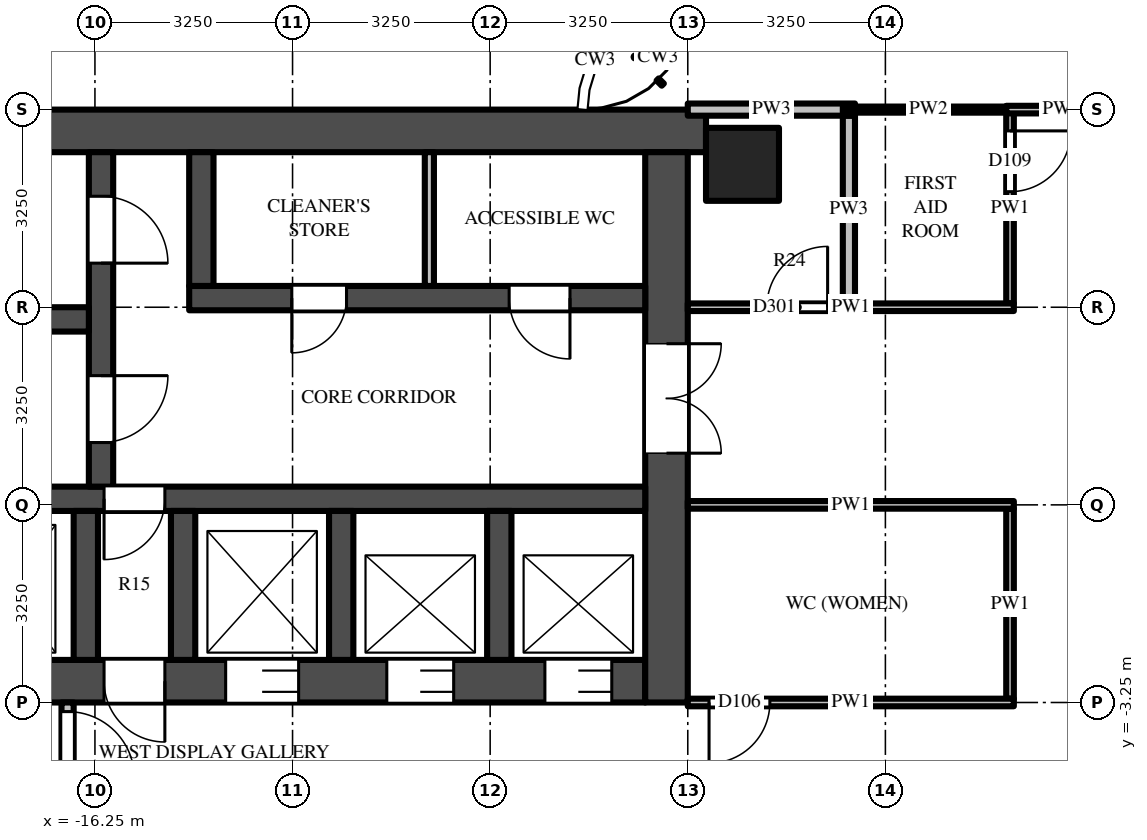
"""IFC4 building model, lengths in metres.
Left out: names, types, materials, properties, quantities, classifications, styles, units other than length and angle.
Written with IfcOpenShell. Run it as: python <this file> out.ifc"""

import sys

from ifc_helpers import new_model, si_unit, direction, frame, frame_2d, origin, origin_2d, place, context, subcontext, project, spatial, rectangle, extrude, source, transform, mapped, element, fill, save


model = new_model("IFC4")
c1 = context("Model", 3, precision=1e-05, world=origin(), true_north=direction((0.0, 1.0)))
c2 = subcontext(c1, "Body", "Model", "MODEL_VIEW")
j1 = project(units=[si_unit("LENGTHUNIT", "METRE"), si_unit("PLANEANGLEUNIT", "RADIAN")], contexts=[c1])
p1 = place(None, origin())
s1 = spatial("IfcSite", under=j1, at=p1, CompositionType="ELEMENT")
p2 = place(p1, origin())
s2 = spatial("IfcBuilding", under=s1, at=p2, CompositionType="ELEMENT")
p3 = place(p2, frame((0.0, 0.0, 208.8)))
s3 = spatial("IfcBuildingStorey", under=s2, at=p3, CompositionType="ELEMENT", Elevation=208.8)
m1 = source(origin(), c2, "Body", "SweptSolid", [
    extrude(rectangle(XDim=1.2, YDim=1.2, at=origin_2d()), origin(), (0.0, 0.0, 1.0), 3.9),
])
p4 = place(p3, frame((-5.6, 5.6, 0.0), z_axis=(0.0, 0.0, 1.0), x_axis=(1.0, 0.0, 0.0)))
e1 = element("IfcColumn", 1, at=p4, inside=s3, PredefinedType="COLUMN", context=c2, shape_type="MappedRepresentation", body=[
    mapped(m1, transform((0.0, 0.0, 0.0))),
])
m2 = source(origin(), c2, "Body", "SweptSolid", [
    extrude(rectangle(XDim=16.55, YDim=0.7, at=frame_2d((8.275, 0.0))), origin(), (0.0, 0.0, 1.0), 3.45),
])
p5 = place(p3, frame((-6.2, 6.15, 0.0), z_axis=(0.0, 0.0, 1.0), x_axis=(-1.0, 0.0, 0.0)))
e2 = element("IfcWall", 2, at=p5, inside=s3, PredefinedType="SHEAR", context=c2, shape_type="MappedRepresentation", body=[
    mapped(m2, transform((0.0, 0.0, 0.0))),
])
m3 = source(origin(), c2, "Body", "SweptSolid", [
    extrude(rectangle(XDim=14.85, YDim=0.7, at=frame_2d((7.425, 0.0))), origin(), (0.0, 0.0, 1.0), 3.45),
])
p6 = place(p3, frame((-7.2, -2.9, 0.0), z_axis=(0.0, 0.0, 1.0), x_axis=(-1.0, 0.0, 0.0)))
e3 = element("IfcWall", 3, at=p6, inside=s3, PredefinedType="SHEAR", context=c2, shape_type="MappedRepresentation", body=[
    mapped(m3, transform((0.0, 0.0, 0.0))),
])
m4 = source(origin(), c2, "Body", "SweptSolid", [
    extrude(rectangle(XDim=1.1, YDim=2.1, at=frame_2d((0.55, 1.05))), frame((0.0, 0.36, 0.0), z_axis=(0.0, -1.0, 0.0), x_axis=(1.0, 0.0, 0.0)), (0.0, 0.0, 1.0), 0.72),
])
p7 = place(p6, frame((0.55, 0.0, 0.0)))
e4 = element("IfcOpeningElement", 4, at=p7, cuts=e3, PredefinedType="OPENING", context=c2, shape_type="MappedRepresentation", body=[
    mapped(m4, transform((0.0, 0.0, 0.0))),
])
p8 = place(p6, frame((3.15, 0.0, 0.0)))
e5 = element("IfcOpeningElement", 5, at=p8, cuts=e3, PredefinedType="OPENING", context=c2, shape_type="MappedRepresentation", body=[
    mapped(m4, transform((0.0, 0.0, 0.0))),
])
m5 = source(origin(), c2, "Body", "SweptSolid", [
    extrude(rectangle(XDim=1.2, YDim=2.1, at=frame_2d((0.6, 1.05))), frame((0.0, 0.36, 0.0), z_axis=(0.0, -1.0, 0.0), x_axis=(1.0, 0.0, 0.0)), (0.0, 0.0, 1.0), 0.72),
])
p9 = place(p6, frame((5.7, 0.0, 0.0)))
e6 = element("IfcOpeningElement", 6, at=p9, cuts=e3, PredefinedType="OPENING", context=c2, shape_type="MappedRepresentation", body=[
    mapped(m5, transform((0.0, 0.0, 0.0))),
])
m6 = source(origin(), c2, "Body", "SweptSolid", [
    extrude(rectangle(XDim=1.3, YDim=2.1, at=frame_2d((0.65, 1.05))), frame((0.0, 0.36, 0.0), z_axis=(0.0, -1.0, 0.0), x_axis=(1.0, 0.0, 0.0)), (0.0, 0.0, 1.0), 0.72),
])
p10 = place(p6, frame((12.2, 0.0, 0.0)))
e7 = element("IfcOpeningElement", 7, at=p10, cuts=e3, PredefinedType="OPENING", context=c2, shape_type="MappedRepresentation", body=[
    mapped(m6, transform((0.0, 0.0, 0.0))),
])
p11 = place(p6, frame((9.85, 0.0, 0.0)))
e8 = element("IfcOpeningElement", 8, at=p11, cuts=e3, PredefinedType="OPENING", context=c2, shape_type="MappedRepresentation", body=[
    mapped(m5, transform((0.0, 0.0, 0.0))),
])
m7 = source(origin(), c2, "Body", "SweptSolid", [
    extrude(rectangle(XDim=1.0, YDim=2.1, at=frame_2d((0.5, 1.05))), frame((0.0, 0.36, 0.0), z_axis=(0.0, -1.0, 0.0), x_axis=(1.0, 0.0, 0.0)), (0.0, 0.0, 1.0), 0.72),
])
p12 = place(p6, frame((7.9, 0.0, 0.0)))
e9 = element("IfcOpeningElement", 9, at=p12, cuts=e3, PredefinedType="OPENING", context=c2, shape_type="MappedRepresentation", body=[
    mapped(m7, transform((0.0, 0.0, 0.0))),
])
m8 = source(origin(), c2, "Body", "SweptSolid", [
    extrude(rectangle(XDim=9.05, YDim=0.7, at=frame_2d((4.525, 0.0))), origin(), (0.0, 0.0, 1.0), 3.45),
])
p13 = place(p3, frame((-6.85, 5.8, 0.0), z_axis=(0.0, 0.0, 1.0), x_axis=(0.0, -1.0, 0.0)))
e10 = element("IfcWall", 10, at=p13, inside=s3, PredefinedType="SHEAR", context=c2, shape_type="MappedRepresentation", body=[
    mapped(m8, transform((0.0, 0.0, 0.0))),
])
m9 = source(origin(), c2, "Body", "SweptSolid", [
    extrude(rectangle(XDim=1.8, YDim=2.1, at=frame_2d((0.9, 1.05))), frame((0.0, 0.36, 0.0), z_axis=(0.0, -1.0, 0.0), x_axis=(1.0, 0.0, 0.0)), (0.0, 0.0, 1.0), 0.72),
])
p14 = place(p13, frame((3.15, 0.0, 0.0)))
e11 = element("IfcOpeningElement", 11, at=p14, cuts=e10, PredefinedType="OPENING", context=c2, shape_type="MappedRepresentation", body=[
    mapped(m9, transform((0.0, 0.0, 0.0))),
])
m10 = source(origin(), c2, "Body", "SweptSolid", [
    extrude(rectangle(XDim=7.5, YDim=0.4, at=frame_2d((3.75, 0.0))), origin(), (0.0, 0.0, 1.0), 3.45),
])
p15 = place(p3, frame((-7.2, 3.4, 0.0), z_axis=(0.0, 0.0, 1.0), x_axis=(-1.0, 0.0, 0.0)))
e12 = element("IfcWall", 12, at=p15, inside=s3, PredefinedType="SHEAR", context=c2, shape_type="MappedRepresentation", body=[
    mapped(m10, transform((0.0, 0.0, 0.0))),
])
m11 = source(origin(), c2, "Body", "SweptSolid", [
    extrude(rectangle(XDim=1.0, YDim=2.1, at=frame_2d((0.5, 1.05))), frame((0.0, 0.21, 0.0), z_axis=(0.0, -1.0, 0.0), x_axis=(1.0, 0.0, 0.0)), (0.0, 0.0, 1.0), 0.42),
])
p16 = place(p15, frame((1.238, 0.0, 0.0)))
e13 = element("IfcOpeningElement", 13, at=p16, cuts=e12, PredefinedType="OPENING", context=c2, shape_type="MappedRepresentation", body=[
    mapped(m11, transform((0.0, 0.0, 0.0))),
])
m12 = source(origin(), c2, "Body", "SweptSolid", [
    extrude(rectangle(XDim=0.9, YDim=2.1, at=frame_2d((0.45, 1.05))), frame((0.0, 0.21, 0.0), z_axis=(0.0, -1.0, 0.0), x_axis=(1.0, 0.0, 0.0)), (0.0, 0.0, 1.0), 0.42),
])
p17 = place(p15, frame((4.913, 0.0, 0.0)))
e14 = element("IfcOpeningElement", 14, at=p17, cuts=e12, PredefinedType="OPENING", context=c2, shape_type="MappedRepresentation", body=[
    mapped(m12, transform((0.0, 0.0, 0.0))),
])
m13 = source(origin(), c2, "Body", "SweptSolid", [
    extrude(rectangle(XDim=14.85, YDim=0.4, at=frame_2d((7.425, 0.0))), origin(), (0.0, 0.0, 1.0), 3.45),
])
p18 = place(p3, frame((-7.2, 0.1, 0.0), z_axis=(0.0, 0.0, 1.0), x_axis=(-1.0, 0.0, 0.0)))
e15 = element("IfcWall", 15, at=p18, inside=s3, PredefinedType="SHEAR", context=c2, shape_type="MappedRepresentation", body=[
    mapped(m13, transform((0.0, 0.0, 0.0))),
])
p19 = place(p18, frame((7.9, 0.0, 0.0)))
e16 = element("IfcOpeningElement", 16, at=p19, cuts=e15, PredefinedType="OPENING", context=c2, shape_type="MappedRepresentation", body=[
    mapped(m11, transform((0.0, 0.0, 0.0))),
])
m14 = source(origin(), c2, "Body", "SweptSolid", [
    extrude(rectangle(XDim=5.5, YDim=0.4, at=frame_2d((2.75, 0.0))), origin(), (0.0, 0.0, 1.0), 3.45),
])
p20 = place(p3, frame((-16.15, 5.8, 0.0), z_axis=(0.0, 0.0, 1.0), x_axis=(0.0, -1.0, 0.0)))
e17 = element("IfcWall", 17, at=p20, inside=s3, PredefinedType="SHEAR", context=c2, shape_type="MappedRepresentation", body=[
    mapped(m14, transform((0.0, 0.0, 0.0))),
])
m15 = source(origin(), c2, "Body", "SweptSolid", [
    extrude(rectangle(XDim=1.1, YDim=2.1, at=frame_2d((0.55, 1.05))), frame((0.0, 0.21, 0.0), z_axis=(0.0, -1.0, 0.0), x_axis=(1.0, 0.0, 0.0)), (0.0, 0.0, 1.0), 0.42),
])
p21 = place(p20, frame((0.725, 0.0, 0.0)))
e18 = element("IfcOpeningElement", 18, at=p21, cuts=e17, PredefinedType="OPENING", context=c2, shape_type="MappedRepresentation", body=[
    mapped(m15, transform((0.0, 0.0, 0.0))),
])
p22 = place(p20, frame((3.675, 0.0, 0.0)))
e19 = element("IfcOpeningElement", 19, at=p22, cuts=e17, PredefinedType="OPENING", context=c2, shape_type="MappedRepresentation", body=[
    mapped(m15, transform((0.0, 0.0, 0.0))),
])
m16 = source(origin(), c2, "Body", "SweptSolid", [
    extrude(rectangle(XDim=5.7, YDim=0.4, at=frame_2d((2.85, 0.0))), origin(), (0.0, 0.0, 1.0), 3.45),
])
p23 = place(p3, frame((-16.35, 3.05, 0.0), z_axis=(0.0, 0.0, 1.0), x_axis=(-1.0, 0.0, 0.0)))
e20 = element("IfcWall", 20, at=p23, inside=s3, PredefinedType="SHEAR", context=c2, shape_type="MappedRepresentation", body=[
    mapped(m16, transform((0.0, 0.0, 0.0))),
])
m17 = source(origin(), c2, "Body", "SweptSolid", [
    extrude(rectangle(XDim=2.2, YDim=0.4, at=frame_2d((1.1, 0.0))), origin(), (0.0, 0.0, 1.0), 3.45),
])
p24 = place(p3, frame((-14.5, 5.8, 0.0), z_axis=(0.0, 0.0, 1.0), x_axis=(0.0, -1.0, 0.0)))
e21 = element("IfcWall", 21, at=p24, inside=s3, PredefinedType="SHEAR", context=c2, shape_type="MappedRepresentation", body=[
    mapped(m17, transform((0.0, 0.0, 0.0))),
])
m18 = source(origin(), c2, "Body", "SweptSolid", [
    extrude(rectangle(XDim=2.45, YDim=0.4, at=frame_2d((1.225, 0.0))), origin(), (0.0, 0.0, 1.0), 3.45),
])
for number, where, z_axis, x_axis in (
    (22, (-9.6, -0.1, 0.0), (0.0, 0.0, 1.0), (0.0, -1.0, 0.0)),
    (23, (-12.2, -0.1, 0.0), (0.0, 0.0, 1.0), (0.0, -1.0, 0.0)),
    (24, (-14.8, -0.1, 0.0), (0.0, 0.0, 1.0), (0.0, -1.0, 0.0)),
    (25, (-16.4, -0.1, 0.0), (0.0, 0.0, 1.0), (0.0, -1.0, 0.0)),
):
    element("IfcWall", number, at=place(p3, frame(where, z_axis=z_axis, x_axis=x_axis)), inside=s3, PredefinedType="SHEAR", context=c2, shape_type="MappedRepresentation", body=[
        mapped(m18, transform((0.0, 0.0, 0.0))),
    ])
m19 = source(origin(), c2, "Body", "SweptSolid", [
    extrude(rectangle(XDim=3.25, YDim=0.2, at=frame_2d((1.625, 0.0))), origin(), (0.0, 0.0, 1.0), 3.45),
])
p25 = place(p3, frame((-16.7, -3.25, 0.0), z_axis=(0.0, 0.0, 1.0), x_axis=(0.0, -1.0, 0.0)))
e26 = element("IfcWall", 26, at=p25, inside=s3, PredefinedType="PARTITIONING", context=c2, shape_type="MappedRepresentation", body=[
    mapped(m19, transform((0.0, 0.0, 0.0))),
])
m20 = source(origin(), c2, "Body", "SweptSolid", [
    extrude(rectangle(XDim=1.1, YDim=2.1, at=frame_2d((0.55, 1.05))), frame((0.0, 0.11, 0.0), z_axis=(0.0, -1.0, 0.0), x_axis=(1.0, 0.0, 0.0)), (0.0, 0.0, 1.0), 0.22),
])
p26 = place(p25, frame((0.15, 0.0, 0.0)))
e27 = element("IfcOpeningElement", 27, at=p26, cuts=e26, PredefinedType="OPENING", context=c2, shape_type="MappedRepresentation", body=[
    mapped(m20, transform((0.0, 0.0, 0.0))),
])
m21 = source(origin(), c2, "Body", "SweptSolid", [
    extrude(rectangle(XDim=2.2, YDim=0.15, at=frame_2d((1.1, 0.0))), origin(), (0.0, 0.0, 1.0), 3.45),
])
p27 = place(p3, frame((-10.75, 5.8, 0.0), z_axis=(0.0, 0.0, 1.0), x_axis=(0.0, -1.0, 0.0)))
e28 = element("IfcWall", 28, at=p27, inside=s3, PredefinedType="PARTITIONING", context=c2, shape_type="MappedRepresentation", body=[
    mapped(m21, transform((0.0, 0.0, 0.0))),
])
p28 = place(p3, frame((-3.85, 3.312, 0.0), z_axis=(0.0, 0.0, 1.0), x_axis=(0.0, 1.0, 0.0)))
e29 = element("IfcWall", 29, at=p28, inside=s3, PredefinedType="PARTITIONING", context=c2, shape_type="SweptSolid", body=[
    extrude(rectangle(XDim=3.087, YDim=0.2, at=frame_2d((1.544, 0.0))), origin(), (0.0, 0.0, 1.0), 2.668),
])
m22 = source(origin(), c2, "Body", "SweptSolid", [
    extrude(rectangle(XDim=3.125, YDim=0.125, at=frame_2d((1.562, 0.0))), origin(), (0.0, 0.0, 1.0), 2.746),
])
p29 = place(p3, frame((-1.2, -0.062, 0.0), z_axis=(0.0, 0.0, 1.0), x_axis=(0.0, -1.0, 0.0)))
e30 = element("IfcWall", 30, at=p29, inside=s3, PredefinedType="PARTITIONING", context=c2, shape_type="MappedRepresentation", body=[
    mapped(m22, transform((0.0, 0.0, 0.0))),
])
m23 = source(origin(), c2, "Body", "SweptSolid", [
    extrude(rectangle(XDim=3.137, YDim=0.125, at=frame_2d((1.569, 0.0))), origin(), (0.0, 0.0, 1.0), 2.668),
])
p30 = place(p3, frame((-1.2, 6.45, 0.0), z_axis=(0.0, 0.0, 1.0), x_axis=(0.0, -1.0, 0.0)))
e31 = element("IfcWall", 31, at=p30, inside=s3, PredefinedType="PARTITIONING", context=c2, shape_type="MappedRepresentation", body=[
    mapped(m23, transform((0.0, 0.0, 0.0))),
])
m24 = source(origin(), c2, "Body", "SweptSolid", [
    extrude(rectangle(XDim=1.0, YDim=2.1, at=frame_2d((0.5, 1.05))), frame((0.0, 0.073, 0.0), z_axis=(0.0, -1.0, 0.0), x_axis=(1.0, 0.0, 0.0)), (0.0, 0.0, 1.0), 0.145),
])
p31 = place(p30, frame((0.3, 0.0, 0.0)))
e32 = element("IfcOpeningElement", 32, at=p31, cuts=e31, PredefinedType="OPENING", context=c2, shape_type="MappedRepresentation", body=[
    mapped(m24, transform((0.0, 0.0, 0.0))),
])
m25 = source(origin(), c2, "Body", "SweptSolid", [
    extrude(rectangle(XDim=5.363, YDim=0.125, at=frame_2d((2.681, 0.0))), origin(), (0.0, 0.0, 1.0), 2.668),
])
p32 = place(p3, frame((-1.137, -3.25, 0.0), z_axis=(0.0, 0.0, 1.0), x_axis=(-1.0, 0.0, 0.0)))
e33 = element("IfcWall", 33, at=p32, inside=s3, PredefinedType="PARTITIONING", context=c2, shape_type="MappedRepresentation", body=[
    mapped(m25, transform((0.0, 0.0, 0.0))),
])
p33 = place(p32, frame((4.012, 0.0, 0.0)))
e34 = element("IfcOpeningElement", 34, at=p33, cuts=e33, PredefinedType="OPENING", context=c2, shape_type="MappedRepresentation", body=[
    mapped(m24, transform((0.0, 0.0, 0.0))),
])
p34 = place(p3, frame((-1.137, 0.0, 0.0), z_axis=(0.0, 0.0, 1.0), x_axis=(-1.0, 0.0, 0.0)))
e35 = element("IfcWall", 35, at=p34, inside=s3, PredefinedType="PARTITIONING", context=c2, shape_type="MappedRepresentation", body=[
    mapped(m25, transform((0.0, 0.0, 0.0))),
])
p35 = place(p3, frame((-6.5, 3.25, 0.0), z_axis=(0.0, 0.0, 1.0), x_axis=(1.0, 0.0, 0.0)))
e36 = element("IfcWall", 36, at=p35, inside=s3, PredefinedType="PARTITIONING", context=c2, shape_type="MappedRepresentation", body=[
    mapped(m25, transform((0.0, 0.0, 0.0))),
])
p36 = place(p35, frame((1.3, 0.0, 0.0)))
e37 = element("IfcOpeningElement", 37, at=p36, cuts=e36, PredefinedType="OPENING", context=c2, shape_type="MappedRepresentation", body=[
    mapped(m24, transform((0.0, 0.0, 0.0))),
])
p37 = place(p3, frame((-6.5, 6.5, 0.0), z_axis=(0.0, 0.0, 1.0), x_axis=(1.0, 0.0, 0.0)))
e38 = element("IfcWall", 38, at=p37, inside=s3, PredefinedType="PARTITIONING", context=c2, shape_type="SweptSolid", body=[
    extrude(rectangle(XDim=2.75, YDim=0.2, at=frame_2d((1.375, 0.0))), origin(), (0.0, 0.0, 1.0), 2.53),
])
p38 = place(p3, frame((-3.95, 6.5, 0.0), z_axis=(0.0, 0.0, 1.0), x_axis=(1.0, 0.0, 0.0)))
e39 = element("IfcWall", 39, at=p38, inside=s3, PredefinedType="PARTITIONING", context=c2, shape_type="SweptSolid", body=[
    extrude(rectangle(XDim=2.812, YDim=0.1, at=frame_2d((1.406, 0.0))), origin(), (0.0, 0.0, 1.0), 3.45),
])
m26 = source(origin(), c2, "Body", "SweptSolid", [
    extrude(rectangle(XDim=1.825, YDim=0.125, at=frame_2d((0.913, 0.0))), origin(), (0.0, 0.0, 1.0), 3.45),
])
p39 = place(p3, frame((-1.262, 6.5, 0.0), z_axis=(0.0, 0.0, 1.0), x_axis=(1.0, 0.0, 0.0)))
e40 = element("IfcWall", 40, at=p39, inside=s3, PredefinedType="PARTITIONING", context=c2, shape_type="MappedRepresentation", body=[
    mapped(m26, transform((0.0, 0.0, 0.0))),
])
m27 = source(origin(), c2, "Body", "SweptSolid", [
    extrude(rectangle(XDim=1.1, YDim=2.1, at=frame_2d((0.55, 1.05))), frame((0.0, -0.275, 0.0), z_axis=(0.0, -1.0, 0.0), x_axis=(1.0, 0.0, 0.0)), (0.0, 0.0, 1.0), 0.05),
])
p40 = place(p7, origin())
e41 = element("IfcDoor", 41, at=p40, inside=s3, OperationType="DOUBLE_DOOR_SLIDING", PredefinedType="DOOR", context=c2, shape_type="MappedRepresentation", body=[
    mapped(m27, transform((0.0, 0.0, 0.0))),
])
fill(e4, e41)
p41 = place(p8, origin())
e42 = element("IfcDoor", 42, at=p41, inside=s3, OperationType="DOUBLE_DOOR_SLIDING", PredefinedType="DOOR", context=c2, shape_type="MappedRepresentation", body=[
    mapped(m27, transform((0.0, 0.0, 0.0))),
])
fill(e5, e42)
m28 = source(origin(), c2, "Body", "SweptSolid", [
    extrude(rectangle(XDim=1.2, YDim=2.1, at=frame_2d((0.6, 1.05))), frame((0.0, -0.275, 0.0), z_axis=(0.0, -1.0, 0.0), x_axis=(1.0, 0.0, 0.0)), (0.0, 0.0, 1.0), 0.05),
])
p42 = place(p9, origin())
e43 = element("IfcDoor", 43, at=p42, inside=s3, OperationType="DOUBLE_DOOR_SLIDING", PredefinedType="DOOR", context=c2, shape_type="MappedRepresentation", body=[
    mapped(m28, transform((0.0, 0.0, 0.0))),
])
fill(e6, e43)
m29 = source(origin(), c2, "Body", "SweptSolid", [
    extrude(rectangle(XDim=1.8, YDim=2.1, at=frame_2d((0.9, 1.05))), frame((0.0, -0.275, 0.0), z_axis=(0.0, -1.0, 0.0), x_axis=(1.0, 0.0, 0.0)), (0.0, 0.0, 1.0), 0.05),
])
p43 = place(p14, origin())
e44 = element("IfcDoor", 44, at=p43, inside=s3, OperationType="DOUBLE_DOOR_SINGLE_SWING", PredefinedType="DOOR", context=c2, shape_type="MappedRepresentation", body=[
    mapped(m29, transform((0.0, 0.0, 0.0))),
])
fill(e11, e44)
m30 = source(origin(), c2, "Body", "SweptSolid", [
    extrude(rectangle(XDim=1.1, YDim=2.1, at=frame_2d((0.55, 1.05))), frame((0.0, 0.025, 0.0), z_axis=(0.0, -1.0, 0.0), x_axis=(1.0, 0.0, 0.0)), (0.0, 0.0, 1.0), 0.05),
])
p44 = place(p21, origin())
e45 = element("IfcDoor", 45, at=p44, inside=s3, OperationType="SINGLE_SWING_RIGHT", PredefinedType="DOOR", context=c2, shape_type="MappedRepresentation", body=[
    mapped(m30, transform((0.0, 0.0, 0.0))),
])
fill(e18, e45)
p45 = place(p22, origin())
e46 = element("IfcDoor", 46, at=p45, inside=s3, OperationType="SINGLE_SWING_LEFT", PredefinedType="DOOR", context=c2, shape_type="MappedRepresentation", body=[
    mapped(m30, transform((0.0, 0.0, 0.0))),
])
fill(e19, e46)
m31 = source(origin(), c2, "Body", "SweptSolid", [
    extrude(rectangle(XDim=1.0, YDim=2.1, at=frame_2d((0.5, 1.05))), frame((0.0, 0.025, 0.0), z_axis=(0.0, -1.0, 0.0), x_axis=(1.0, 0.0, 0.0)), (0.0, 0.0, 1.0), 0.05),
])
p46 = place(p19, origin())
e47 = element("IfcDoor", 47, at=p46, inside=s3, OperationType="SINGLE_SWING_RIGHT", PredefinedType="DOOR", context=c2, shape_type="MappedRepresentation", body=[
    mapped(m31, transform((0.0, 0.0, 0.0))),
])
fill(e16, e47)
m32 = source(origin(), c2, "Body", "SweptSolid", [
    extrude(rectangle(XDim=1.0, YDim=2.1, at=frame_2d((0.5, 1.05))), frame((0.0, -0.275, 0.0), z_axis=(0.0, -1.0, 0.0), x_axis=(1.0, 0.0, 0.0)), (0.0, 0.0, 1.0), 0.05),
])
p47 = place(p12, origin())
e48 = element("IfcDoor", 48, at=p47, inside=s3, OperationType="SINGLE_SWING_LEFT", PredefinedType="DOOR", context=c2, shape_type="MappedRepresentation", body=[
    mapped(m32, transform((0.0, 0.0, 0.0))),
])
fill(e9, e48)
p48 = place(p26, origin())
e49 = element("IfcDoor", 49, at=p48, inside=s3, OperationType="SINGLE_SWING_RIGHT", PredefinedType="DOOR", context=c2, shape_type="MappedRepresentation", body=[
    mapped(m30, transform((0.0, 0.0, 0.0))),
])
fill(e27, e49)
p49 = place(p16, origin())
e50 = element("IfcDoor", 50, at=p49, inside=s3, OperationType="SINGLE_SWING_LEFT", PredefinedType="DOOR", context=c2, shape_type="MappedRepresentation", body=[
    mapped(m31, transform((0.0, 0.0, 0.0))),
])
fill(e13, e50)
m33 = source(origin(), c2, "Body", "SweptSolid", [
    extrude(rectangle(XDim=0.9, YDim=2.1, at=frame_2d((0.45, 1.05))), frame((0.0, 0.025, 0.0), z_axis=(0.0, -1.0, 0.0), x_axis=(1.0, 0.0, 0.0)), (0.0, 0.0, 1.0), 0.05),
])
p50 = place(p17, origin())
e51 = element("IfcDoor", 51, at=p50, inside=s3, OperationType="SINGLE_SWING_RIGHT", PredefinedType="DOOR", context=c2, shape_type="MappedRepresentation", body=[
    mapped(m33, transform((0.0, 0.0, 0.0))),
])
fill(e14, e51)
p51 = place(p33, origin())
e52 = element("IfcDoor", 52, at=p51, inside=s3, OperationType="SINGLE_SWING_RIGHT", PredefinedType="DOOR", context=c2, shape_type="MappedRepresentation", body=[
    mapped(m31, transform((0.0, 0.0, 0.0))),
])
fill(e34, e52)
p52 = place(p36, origin())
e53 = element("IfcDoor", 53, at=p52, inside=s3, OperationType="SINGLE_SWING_RIGHT", PredefinedType="DOOR", context=c2, shape_type="MappedRepresentation", body=[
    mapped(m31, transform((0.0, 0.0, 0.0))),
])
fill(e37, e53)
p53 = place(p31, origin())
e54 = element("IfcDoor", 54, at=p53, inside=s3, OperationType="SINGLE_SWING_LEFT", PredefinedType="DOOR", context=c2, shape_type="MappedRepresentation", body=[
    mapped(m31, transform((0.0, 0.0, 0.0))),
])
fill(e32, e54)
save(model, sys.argv[1])
